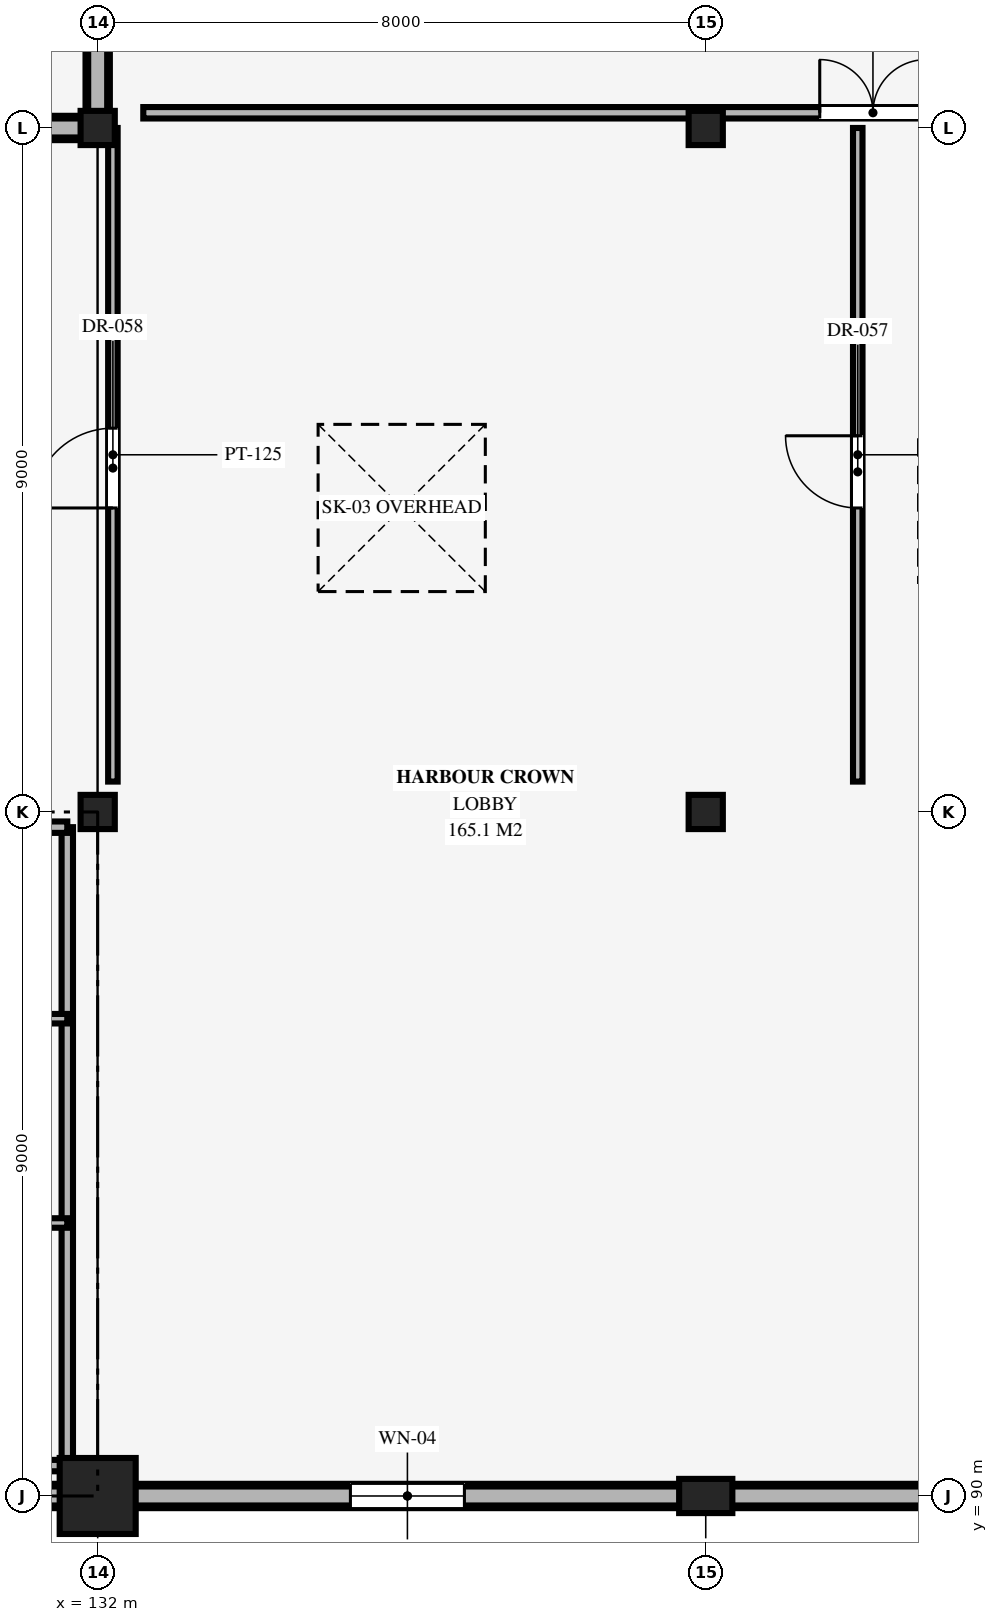
"""IFC4 building model, lengths in metres.
Left out: names, types, materials, properties, quantities, classifications, styles, units other than length and angle.
Written with IfcOpenShell. Run it as: python <this file> out.ifc"""

import sys

from ifc_helpers import new_model, si_unit, direction, frame, frame_2d, origin, origin_2d, place, context, subcontext, project, spatial, rectangle, extrude, element, fill, save


model = new_model("IFC4")
c1 = context("Model", 3, precision=1e-05, world=origin(), true_north=direction((0.0, 1.0)))
c2 = subcontext(c1, "Body", "Model", "MODEL_VIEW")
j1 = project(units=[si_unit("LENGTHUNIT", "METRE"), si_unit("PLANEANGLEUNIT", "RADIAN")], contexts=[c1])
p1 = place(None, origin())
s1 = spatial("IfcSite", under=j1, at=p1, CompositionType="ELEMENT")
p2 = place(p1, origin())
s2 = spatial("IfcBuilding", under=s1, at=p2, CompositionType="ELEMENT")
p3 = place(p2, frame((0.0, 0.0, 23.7)))
s3 = spatial("IfcBuildingStorey", under=s2, at=p3, CompositionType="ELEMENT", Elevation=23.7)
p4 = place(p3, frame((132.0, 90.0, 0.0), z_axis=(0.0, 0.0, 1.0), x_axis=(1.0, 0.0, 0.0)))
e1 = element("IfcColumn", 1, at=p4, inside=s3, PredefinedType="COLUMN", context=c2, shape_type="SweptSolid", body=[
    extrude(rectangle(XDim=1.0, YDim=1.0, at=origin_2d()), origin(), (0.0, 0.0, 1.0), 4.2),
])
for number, where, z_axis, x_axis in (
    (2, (132.0, 99.0, 0.0), (0.0, 0.0, 1.0), (1.0, 0.0, 0.0)),
    (3, (132.0, 108.0, 0.0), (0.0, 0.0, 1.0), (1.0, 0.0, 0.0)),
):
    element("IfcColumn", number, at=place(p3, frame(where, z_axis=z_axis, x_axis=x_axis)), inside=s3, PredefinedType="COLUMN", context=c2, shape_type="SweptSolid", body=[
        extrude(rectangle(XDim=0.45, YDim=0.45, at=origin_2d()), origin(), (0.0, 0.0, 1.0), 4.04),
    ])
p5 = place(p3, frame((140.0, 90.0, 0.0), z_axis=(0.0, 0.0, 1.0), x_axis=(0.0, 1.0, 0.0)))
e4 = element("IfcColumn", 4, at=p5, inside=s3, PredefinedType="PILASTER", context=c2, shape_type="SweptSolid", body=[
    extrude(rectangle(XDim=0.45, YDim=0.7, at=origin_2d()), origin(), (0.0, 0.0, 1.0), 4.04),
])
for number, where, z_axis, x_axis in (
    (5, (140.0, 99.0, 0.0), (0.0, 0.0, 1.0), (1.0, 0.0, 0.0)),
    (6, (140.0, 108.0, 0.0), (0.0, 0.0, 1.0), (1.0, 0.0, 0.0)),
):
    element("IfcColumn", number, at=place(p3, frame(where, z_axis=z_axis, x_axis=x_axis)), inside=s3, PredefinedType="COLUMN", context=c2, shape_type="SweptSolid", body=[
        extrude(rectangle(XDim=0.45, YDim=0.45, at=origin_2d()), origin(), (0.0, 0.0, 1.0), 4.04),
    ])
p6 = place(p3, frame((131.5, 90.0, 0.0), z_axis=(0.0, 0.0, 1.0), x_axis=(-1.0, 0.0, 0.0)))
e7 = element("IfcWall", 7, at=p6, inside=s3, PredefinedType="SOLIDWALL", context=c2, shape_type="SweptSolid", body=[
    extrude(rectangle(XDim=11.15, YDim=0.32, at=frame_2d((5.575, 0.0))), origin(), (0.0, 0.0, 1.0), 3.98),
])
p7 = place(p6, frame((1.6, 0.0, 1.0)))
e8 = element("IfcOpeningElement", 8, at=p7, cuts=e7, PredefinedType="OPENING", context=c2, shape_type="SweptSolid", body=[
    extrude(rectangle(XDim=1.8, YDim=2.2, at=frame_2d((0.9, 1.1))), frame((0.0, 0.17, 0.0), z_axis=(0.0, -1.0, 0.0), x_axis=(1.0, 0.0, 0.0)), (0.0, 0.0, 1.0), 0.34),
])
p8 = place(p3, frame((139.65, 90.0, 0.0), z_axis=(0.0, 0.0, 1.0), x_axis=(-1.0, 0.0, 0.0)))
e9 = element("IfcWall", 9, at=p8, inside=s3, PredefinedType="SOLIDWALL", context=c2, shape_type="SweptSolid", body=[
    extrude(rectangle(XDim=7.15, YDim=0.32, at=frame_2d((3.575, 0.0))), origin(), (0.0, 0.0, 1.0), 3.98),
])
p9 = place(p8, frame((2.825, 0.0, 1.0)))
e10 = element("IfcOpeningElement", 10, at=p9, cuts=e9, PredefinedType="OPENING", context=c2, shape_type="SweptSolid", body=[
    extrude(rectangle(XDim=1.5, YDim=2.2, at=frame_2d((0.75, 1.1))), frame((0.0, 0.17, 0.0), z_axis=(0.0, -1.0, 0.0), x_axis=(1.0, 0.0, 0.0)), (0.0, 0.0, 1.0), 0.34),
])
p10 = place(p3, frame((147.65, 90.0, 0.0), z_axis=(0.0, 0.0, 1.0), x_axis=(-1.0, 0.0, 0.0)))
e11 = element("IfcWall", 11, at=p10, inside=s3, PredefinedType="SOLIDWALL", context=c2, shape_type="SweptSolid", body=[
    extrude(rectangle(XDim=7.3, YDim=0.32, at=frame_2d((3.65, 0.0))), origin(), (0.0, 0.0, 1.0), 3.98),
])
p11 = place(p10, frame((3.05, 0.0, 1.0)))
e12 = element("IfcOpeningElement", 12, at=p11, cuts=e11, PredefinedType="OPENING", context=c2, shape_type="SweptSolid", body=[
    extrude(rectangle(XDim=1.2, YDim=2.2, at=frame_2d((0.6, 1.1))), frame((0.0, 0.17, 0.0), z_axis=(0.0, -1.0, 0.0), x_axis=(1.0, 0.0, 0.0)), (0.0, 0.0, 1.0), 0.34),
])
p12 = place(p3, frame((132.0, 116.775, 0.0), z_axis=(0.0, 0.0, 1.0), x_axis=(0.0, -1.0, 0.0)))
e13 = element("IfcWall", 13, at=p12, inside=s3, PredefinedType="SOLIDWALL", context=c2, shape_type="SweptSolid", body=[
    extrude(rectangle(XDim=8.55, YDim=0.32, at=frame_2d((4.275, 0.0))), origin(), (0.0, 0.0, 1.0), 3.98),
])
p13 = place(p12, frame((3.675, 0.0, 1.0)))
e14 = element("IfcOpeningElement", 14, at=p13, cuts=e13, PredefinedType="OPENING", context=c2, shape_type="SweptSolid", body=[
    extrude(rectangle(XDim=1.2, YDim=1.8, at=frame_2d((0.6, 0.9))), frame((0.0, 0.17, 0.0), z_axis=(0.0, -1.0, 0.0), x_axis=(1.0, 0.0, 0.0)), (0.0, 0.0, 1.0), 0.34),
])
p14 = place(p3, frame((120.225, 108.0, 0.0), z_axis=(0.0, 0.0, 1.0), x_axis=(1.0, 0.0, 0.0)))
e15 = element("IfcWall", 15, at=p14, inside=s3, PredefinedType="SOLIDWALL", context=c2, shape_type="SweptSolid", body=[
    extrude(rectangle(XDim=11.55, YDim=0.32, at=frame_2d((5.775, 0.0))), origin(), (0.0, 0.0, 1.0), 3.98),
])
p15 = place(p3, frame((120.2, 90.0, 4.2), z_axis=(0.0, 0.0, 1.0), x_axis=(1.0, 0.0, 0.0)))
e16 = element("IfcWall", 16, at=p15, inside=s3, PredefinedType="PARAPET", context=c2, shape_type="SweptSolid", body=[
    extrude(rectangle(XDim=51.8, YDim=0.25, at=frame_2d((25.9, 0.0))), origin(), (0.0, 0.0, 1.0), 1.35),
])
p16 = place(p3, frame((132.0, 120.0, 4.2), z_axis=(0.0, 0.0, 1.0), x_axis=(0.0, -1.0, 0.0)))
e17 = element("IfcWall", 17, at=p16, inside=s3, PredefinedType="PARAPET", context=c2, shape_type="SweptSolid", body=[
    extrude(rectangle(XDim=12.0, YDim=0.25, at=frame_2d((6.0, 0.0))), origin(), (0.0, 0.0, 1.0), 1.35),
])
p17 = place(p3, frame((132.0, 108.0, 4.2), z_axis=(0.0, 0.0, 1.0), x_axis=(-1.0, 0.0, 0.0)))
e18 = element("IfcWall", 18, at=p17, inside=s3, PredefinedType="PARAPET", context=c2, shape_type="SweptSolid", body=[
    extrude(rectangle(XDim=24.0, YDim=0.25, at=frame_2d((12.0, 0.0))), origin(), (0.0, 0.0, 1.0), 1.35),
])
p18 = place(p3, frame((131.6, 90.4, 0.0), z_axis=(0.0, 0.0, 1.0), x_axis=(0.0, 1.0, 0.0)))
e19 = element("IfcWall", 19, at=p18, inside=s3, PredefinedType="PARTITIONING", context=c2, shape_type="SweptSolid", body=[
    extrude(rectangle(XDim=8.4, YDim=0.15, at=frame_2d((4.2, 0.0))), origin(), (0.0, 0.0, 1.0), 3.25),
])
for number, where, z_axis, x_axis in (
    (20, (122.6, 98.8, 0.0), (0.0, 0.0, 1.0), (1.0, 0.0, 0.0)),
    (21, (122.6, 90.4, 0.0), (0.0, 0.0, 1.0), (1.0, 0.0, 0.0)),
):
    element("IfcWall", number, at=place(p3, frame(where, z_axis=z_axis, x_axis=x_axis)), inside=s3, PredefinedType="PARTITIONING", context=c2, shape_type="SweptSolid", body=[
        extrude(rectangle(XDim=9.0, YDim=0.15, at=frame_2d((4.5, 0.0))), origin(), (0.0, 0.0, 1.0), 3.25),
    ])
for number, where, z_axis, x_axis in (
    (22, (122.6, 93.592, 0.0), (0.0, 0.0, 1.0), (1.0, 0.0, 0.0)),
    (23, (122.6, 96.28, 0.0), (0.0, 0.0, 1.0), (1.0, 0.0, 0.0)),
):
    element("IfcWall", number, at=place(p3, frame(where, z_axis=z_axis, x_axis=x_axis)), inside=s3, PredefinedType="PARTITIONING", context=c2, shape_type="SweptSolid", body=[
        extrude(rectangle(XDim=9.0, YDim=0.125, at=frame_2d((4.5, 0.0))), origin(), (0.0, 0.0, 1.0), 3.25),
    ])
p19 = place(p3, frame((132.6, 108.2, 0.0), z_axis=(0.0, 0.0, 1.0), x_axis=(1.0, 0.0, 0.0)))
e24 = element("IfcWall", 24, at=p19, inside=s3, PredefinedType="PARTITIONING", context=c2, shape_type="SweptSolid", body=[
    extrude(rectangle(XDim=38.8, YDim=0.15, at=frame_2d((19.4, 0.0))), origin(), (0.0, 0.0, 1.0), 3.25),
])
p20 = place(p19, frame((8.9, 0.0, 0.0)))
e25 = element("IfcOpeningElement", 25, at=p20, cuts=e24, PredefinedType="OPENING", context=c2, shape_type="SweptSolid", body=[
    extrude(rectangle(XDim=1.4, YDim=2.15, at=frame_2d((0.7, 1.075))), frame((0.0, 0.085, 0.0), z_axis=(0.0, -1.0, 0.0), x_axis=(1.0, 0.0, 0.0)), (0.0, 0.0, 1.0), 0.17),
])
p21 = place(p3, frame((142.0, 99.4, 0.0), z_axis=(0.0, 0.0, 1.0), x_axis=(0.0, 1.0, 0.0)))
e26 = element("IfcWall", 26, at=p21, inside=s3, PredefinedType="PARTITIONING", context=c2, shape_type="SweptSolid", body=[
    extrude(rectangle(XDim=8.6, YDim=0.125, at=frame_2d((4.3, 0.0))), origin(), (0.0, 0.0, 1.0), 3.25),
])
p22 = place(p21, frame((3.6, 0.0, 0.0)))
e27 = element("IfcOpeningElement", 27, at=p22, cuts=e26, PredefinedType="OPENING", context=c2, shape_type="SweptSolid", body=[
    extrude(rectangle(XDim=0.95, YDim=2.1, at=frame_2d((0.475, 1.05))), frame((0.0, 0.073, 0.0), z_axis=(0.0, -1.0, 0.0), x_axis=(1.0, 0.0, 0.0)), (0.0, 0.0, 1.0), 0.145),
])
p23 = place(p3, frame((132.2, 99.4, 0.0), z_axis=(0.0, 0.0, 1.0), x_axis=(0.0, 1.0, 0.0)))
e28 = element("IfcWall", 28, at=p23, inside=s3, PredefinedType="PARTITIONING", context=c2, shape_type="SweptSolid", body=[
    extrude(rectangle(XDim=8.6, YDim=0.125, at=frame_2d((4.3, 0.0))), origin(), (0.0, 0.0, 1.0), 3.25),
])
p24 = place(p23, frame((3.6, 0.0, 0.0)))
e29 = element("IfcOpeningElement", 29, at=p24, cuts=e28, PredefinedType="OPENING", context=c2, shape_type="SweptSolid", body=[
    extrude(rectangle(XDim=1.05, YDim=2.15, at=frame_2d((0.525, 1.075))), frame((0.0, 0.073, 0.0), z_axis=(0.0, -1.0, 0.0), x_axis=(1.0, 0.0, 0.0)), (0.0, 0.0, 1.0), 0.145),
])
p25 = place(p9, origin())
e30 = element("IfcWindow", 30, at=p25, inside=s3, PartitioningType="SINGLE_PANEL", PredefinedType="WINDOW", context=c2, shape_type="SweptSolid", body=[
    extrude(rectangle(XDim=1.5, YDim=2.2, at=frame_2d((0.75, 1.1))), frame((0.0, 0.03, 0.0), z_axis=(0.0, -1.0, 0.0), x_axis=(1.0, 0.0, 0.0)), (0.0, 0.0, 1.0), 0.06),
])
fill(e10, e30)
p26 = place(p2, frame((0.0, 0.0, 27.9)))
p27 = place(p26, frame((0.0, 0.0, -0.22)))
p28 = place(p27, frame((136.0, 103.0, 0.0)))
p29 = place(p28, frame((0.0, 0.0, 0.17)))
e31 = element("IfcWindow", 31, at=p29, inside=s3, PartitioningType="SINGLE_PANEL", PredefinedType="SKYLIGHT", context=c2, shape_type="SweptSolid", body=[
    extrude(rectangle(XDim=2.2, YDim=2.2, at=origin_2d()), origin(), (0.0, 0.0, 1.0), 0.05),
])
p30 = place(p20, origin())
e32 = element("IfcDoor", 32, at=p30, inside=s3, OperationType="DOUBLE_DOOR_SINGLE_SWING", PredefinedType="DOOR", context=c2, shape_type="SweptSolid", body=[
    extrude(rectangle(XDim=1.4, YDim=2.15, at=frame_2d((0.7, 1.075))), frame((0.0, 0.025, 0.0), z_axis=(0.0, -1.0, 0.0), x_axis=(1.0, 0.0, 0.0)), (0.0, 0.0, 1.0), 0.05),
])
fill(e25, e32)
p31 = place(p22, origin())
e33 = element("IfcDoor", 33, at=p31, inside=s3, OperationType="SINGLE_SWING_RIGHT", PredefinedType="DOOR", context=c2, shape_type="SweptSolid", body=[
    extrude(rectangle(XDim=0.95, YDim=2.1, at=frame_2d((0.475, 1.05))), frame((0.0, 0.025, 0.0), z_axis=(0.0, -1.0, 0.0), x_axis=(1.0, 0.0, 0.0)), (0.0, 0.0, 1.0), 0.05),
])
fill(e27, e33)
p32 = place(p24, origin())
e34 = element("IfcDoor", 34, at=p32, inside=s3, OperationType="SINGLE_SWING_LEFT", PredefinedType="DOOR", context=c2, shape_type="SweptSolid", body=[
    extrude(rectangle(XDim=1.05, YDim=2.15, at=frame_2d((0.525, 1.075))), frame((0.0, 0.025, 0.0), z_axis=(0.0, -1.0, 0.0), x_axis=(1.0, 0.0, 0.0)), (0.0, 0.0, 1.0), 0.05),
])
fill(e29, e34)
save(model, sys.argv[1])
